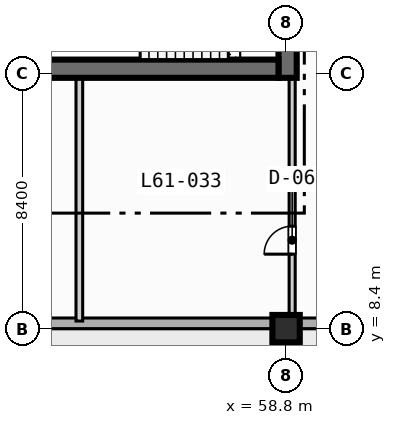
"""IFC4 building model, lengths in metres.
Left out: names, types, materials, properties, quantities, classifications, styles, units other than length and angle.
Written with IfcOpenShell. Run it as: python <this file> out.ifc"""

import sys

from ifc_helpers import new_model, si_unit, direction, frame, frame_2d, origin, origin_2d, place, context, subcontext, project, spatial, rectangle, extrude, element, fill, save


model = new_model("IFC4")
c1 = context("Model", 3, precision=1e-05, world=origin(), true_north=direction((0.0, 1.0)))
c2 = subcontext(c1, "Body", "Model", "MODEL_VIEW")
j1 = project(units=[si_unit("LENGTHUNIT", "METRE"), si_unit("PLANEANGLEUNIT", "RADIAN")], contexts=[c1])
p1 = place(None, origin())
s1 = spatial("IfcSite", under=j1, at=p1, CompositionType="ELEMENT")
p2 = place(p1, origin())
s2 = spatial("IfcBuilding", under=s1, at=p2, CompositionType="ELEMENT")
p3 = place(p2, frame((0.0, 0.0, 249.0)))
s3 = spatial("IfcBuildingStorey", under=s2, at=p3, CompositionType="ELEMENT", Elevation=249.0)
p4 = place(p3, frame((58.85, 16.65, 0.0), z_axis=(0.0, 0.0, 1.0), x_axis=(0.0, 1.0, 0.0)))
e1 = element("IfcWall", 1, at=p4, inside=s3, PredefinedType="SHEAR", context=c2, shape_type="SweptSolid", body=[
    extrude(rectangle(XDim=1.35, YDim=0.6, at=frame_2d((0.675, 0.0))), origin(), (0.0, 0.0, 1.0), 3.47),
])
p5 = place(p3, frame((42.2, 16.95, 0.0), z_axis=(0.0, 0.0, 1.0), x_axis=(1.0, 0.0, 0.0)))
e2 = element("IfcWall", 2, at=p5, inside=s3, PredefinedType="SHEAR", context=c2, shape_type="SweptSolid", body=[
    extrude(rectangle(XDim=16.35, YDim=0.6, at=frame_2d((8.175, 0.0))), origin(), (0.0, 0.0, 1.0), 3.47),
])
p6 = place(p3, frame((58.8, 8.4, 0.0), z_axis=(0.0, 0.0, 1.0), x_axis=(1.0, 0.0, 0.0)))
e3 = element("IfcColumn", 3, at=p6, inside=s3, PredefinedType="COLUMN", context=c2, shape_type="SweptSolid", body=[
    extrude(rectangle(XDim=0.9, YDim=0.9, at=origin_2d()), origin(), (0.0, 0.0, 1.0), 3.7),
])
p7 = place(p3, frame((72.425, 8.575, 0.0), z_axis=(0.0, 0.0, 1.0), x_axis=(-1.0, 0.0, 0.0)))
e4 = element("IfcWall", 4, at=p7, inside=s3, PredefinedType="STANDARD", context=c2, shape_type="SweptSolid", body=[
    extrude(rectangle(XDim=60.85, YDim=0.35, at=frame_2d((30.425, 0.0))), origin(), (0.0, 0.0, 1.0), 3.47),
])
p8 = place(p7, frame((42.325, 0.0, 0.0)))
e5 = element("IfcOpeningElement", 5, at=p8, cuts=e4, PredefinedType="OPENING", context=c2, shape_type="SweptSolid", body=[
    extrude(rectangle(XDim=1.4, YDim=2.2, at=frame_2d((0.7, 1.1))), frame((0.0, 0.185, 0.0), z_axis=(0.0, -1.0, 0.0), x_axis=(1.0, 0.0, 0.0)), (0.0, 0.0, 1.0), 0.37),
])
p9 = place(p7, frame((50.225, 0.0, 0.85)))
e6 = element("IfcOpeningElement", 6, at=p9, cuts=e4, PredefinedType="OPENING", context=c2, shape_type="SweptSolid", body=[
    extrude(rectangle(XDim=2.4, YDim=1.95, at=frame_2d((1.2, 0.975))), frame((0.0, 0.185, 0.0), z_axis=(0.0, -1.0, 0.0), x_axis=(1.0, 0.0, 0.0)), (0.0, 0.0, 1.0), 0.37),
])
p10 = place(p7, frame((33.425, 0.0, 0.85)))
e7 = element("IfcOpeningElement", 7, at=p10, cuts=e4, PredefinedType="OPENING", context=c2, shape_type="SweptSolid", body=[
    extrude(rectangle(XDim=2.4, YDim=1.95, at=frame_2d((1.2, 0.975))), frame((0.0, 0.185, 0.0), z_axis=(0.0, -1.0, 0.0), x_axis=(1.0, 0.0, 0.0)), (0.0, 0.0, 1.0), 0.37),
])
p11 = place(p7, frame((25.325, 0.0, 0.85)))
e8 = element("IfcOpeningElement", 8, at=p11, cuts=e4, PredefinedType="OPENING", context=c2, shape_type="SweptSolid", body=[
    extrude(rectangle(XDim=1.8, YDim=1.8, at=frame_2d((0.9, 0.9))), frame((0.0, 0.185, 0.0), z_axis=(0.0, -1.0, 0.0), x_axis=(1.0, 0.0, 0.0)), (0.0, 0.0, 1.0), 0.37),
])
p12 = place(p7, frame((58.675, 0.0, 0.85)))
e9 = element("IfcOpeningElement", 9, at=p12, cuts=e4, PredefinedType="OPENING", context=c2, shape_type="SweptSolid", body=[
    extrude(rectangle(XDim=1.8, YDim=1.8, at=frame_2d((0.9, 0.9))), frame((0.0, 0.185, 0.0), z_axis=(0.0, -1.0, 0.0), x_axis=(1.0, 0.0, 0.0)), (0.0, 0.0, 1.0), 0.37),
])
p13 = place(p3, frame((59.0, 8.65, 0.0), z_axis=(0.0, 0.0, 1.0), x_axis=(0.0, 1.0, 0.0)))
e10 = element("IfcWall", 10, at=p13, inside=s3, PredefinedType="PARTITIONING", context=c2, shape_type="SweptSolid", body=[
    extrude(rectangle(XDim=7.95, YDim=0.2, at=frame_2d((3.975, 0.0))), origin(), (0.0, 0.0, 1.0), 2.82),
])
p14 = place(p13, frame((2.2, 0.0, 0.0)))
e11 = element("IfcOpeningElement", 11, at=p14, cuts=e10, PredefinedType="OPENING", context=c2, shape_type="SweptSolid", body=[
    extrude(rectangle(XDim=0.92, YDim=2.1, at=frame_2d((0.46, 1.05))), frame((0.0, 0.11, 0.0), z_axis=(0.0, -1.0, 0.0), x_axis=(1.0, 0.0, 0.0)), (0.0, 0.0, 1.0), 0.22),
])
p15 = place(p3, frame((52.0, 8.65, 0.0), z_axis=(0.0, 0.0, 1.0), x_axis=(0.0, 1.0, 0.0)))
e12 = element("IfcWall", 12, at=p15, inside=s3, PredefinedType="PARTITIONING", context=c2, shape_type="SweptSolid", body=[
    extrude(rectangle(XDim=7.95, YDim=0.22, at=frame_2d((3.975, 0.0))), origin(), (0.0, 0.0, 1.0), 3.47),
])
p16 = place(p14, origin())
e13 = element("IfcDoor", 13, at=p16, inside=s3, OperationType="SINGLE_SWING_LEFT", PredefinedType="DOOR", context=c2, shape_type="SweptSolid", body=[
    extrude(rectangle(XDim=0.92, YDim=2.1, at=frame_2d((0.46, 1.05))), frame((0.0, 0.025, 0.0), z_axis=(0.0, -1.0, 0.0), x_axis=(1.0, 0.0, 0.0)), (0.0, 0.0, 1.0), 0.05),
])
fill(e11, e13)
save(model, sys.argv[1])
